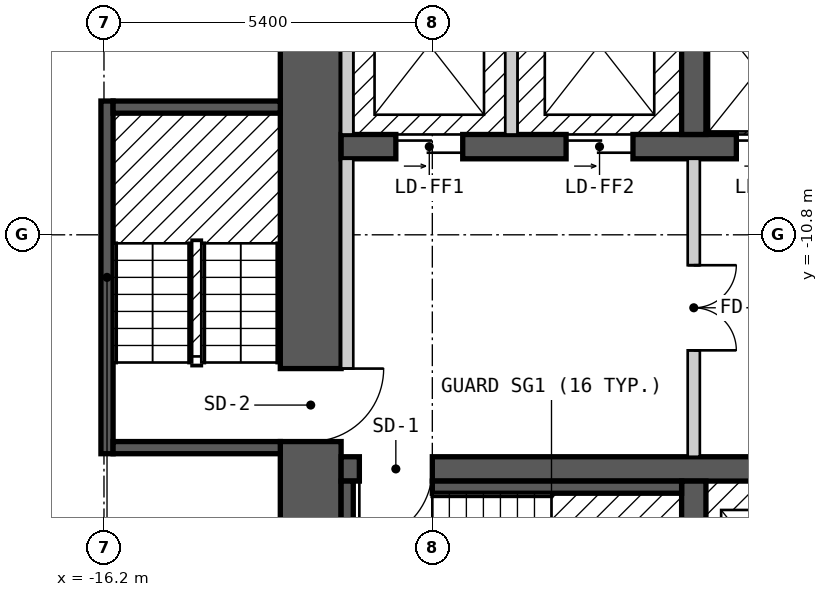
"""IFC4 building model, lengths in metres.
Left out: names, types, materials, properties, quantities, classifications, styles, units other than length and angle.
Written with IfcOpenShell. Run it as: python <this file> out.ifc"""

import sys

from ifc_helpers import new_model, si_unit, direction, frame, frame_2d, origin, place, context, subcontext, project, spatial, rectangle, extrude, element, fill, save


model = new_model("IFC4")
c1 = context("Model", 3, precision=1e-05, world=origin(), true_north=direction((0.0, 1.0)))
c2 = subcontext(c1, "Body", "Model", "MODEL_VIEW")
j1 = project(units=[si_unit("LENGTHUNIT", "METRE"), si_unit("PLANEANGLEUNIT", "RADIAN")], contexts=[c1])
p1 = place(None, origin())
s1 = spatial("IfcSite", under=j1, at=p1, CompositionType="ELEMENT")
p2 = place(p1, origin())
s2 = spatial("IfcBuilding", under=s1, at=p2, CompositionType="ELEMENT")
p3 = place(p2, frame((0.0, 0.0, 93.0)))
s3 = spatial("IfcBuildingStorey", under=s2, at=p3, CompositionType="ELEMENT", Elevation=93.0)
p4 = place(p3, frame((-12.8, -18.0, 0.0), z_axis=(0.0, 0.0, 1.0), x_axis=(0.0, 1.0, 0.0)))
e1 = element("IfcWall", 1, at=p4, inside=s3, PredefinedType="SHEAR", context=c2, shape_type="SweptSolid", body=[
    extrude(rectangle(XDim=12.0, YDim=1.0, at=frame_2d((6.0, 0.0))), origin(), (0.0, 0.0, 1.0), 2.7),
])
p5 = place(p4, frame((3.8, 0.0, 0.0)))
e2 = element("IfcOpeningElement", 2, at=p5, cuts=e1, PredefinedType="OPENING", context=c2, shape_type="SweptSolid", body=[
    extrude(rectangle(XDim=1.2, YDim=2.1, at=frame_2d((0.6, 1.05))), frame((0.0, 0.51, 0.0), z_axis=(0.0, -1.0, 0.0), x_axis=(1.0, 0.0, 0.0)), (0.0, 0.0, 1.0), 1.02),
])
p6 = place(p3, frame((-12.3, -14.65, 0.0), z_axis=(0.0, 0.0, 1.0), x_axis=(1.0, 0.0, 0.0)))
e3 = element("IfcWall", 3, at=p6, inside=s3, PredefinedType="SHEAR", context=c2, shape_type="SweptSolid", body=[
    extrude(rectangle(XDim=24.6, YDim=0.4, at=frame_2d((12.3, 0.0))), origin(), (0.0, 0.0, 1.0), 2.7),
])
p7 = place(p6, frame((1.5, 0.0, 0.0), z_axis=(0.0, 0.0, 1.0), x_axis=(-1.0, 0.0, 0.0)))
e4 = element("IfcOpeningElement", 4, at=p7, cuts=e3, PredefinedType="OPENING", context=c2, shape_type="SweptSolid", body=[
    extrude(rectangle(XDim=1.2, YDim=2.1, at=frame_2d((0.6, 1.05))), frame((0.0, 0.21, 0.0), z_axis=(0.0, -1.0, 0.0), x_axis=(1.0, 0.0, 0.0)), (0.0, 0.0, 1.0), 0.42),
])
p8 = place(p6, frame((24.35, 0.0, 0.0), z_axis=(0.0, 0.0, 1.0), x_axis=(-1.0, 0.0, 0.0)))
e5 = element("IfcOpeningElement", 5, at=p8, cuts=e3, PredefinedType="OPENING", context=c2, shape_type="SweptSolid", body=[
    extrude(rectangle(XDim=1.2, YDim=2.1, at=frame_2d((0.6, 1.05))), frame((0.0, 0.21, 0.0), z_axis=(0.0, -1.0, 0.0), x_axis=(1.0, 0.0, 0.0)), (0.0, 0.0, 1.0), 0.42),
])
p9 = place(p6, frame((16.8, 0.0, 0.0), z_axis=(0.0, 0.0, 1.0), x_axis=(-1.0, 0.0, 0.0)))
e6 = element("IfcOpeningElement", 6, at=p9, cuts=e3, PredefinedType="OPENING", context=c2, shape_type="SweptSolid", body=[
    extrude(rectangle(XDim=1.0, YDim=2.1, at=frame_2d((0.5, 1.05))), frame((0.0, 0.21, 0.0), z_axis=(0.0, -1.0, 0.0), x_axis=(1.0, 0.0, 0.0)), (0.0, 0.0, 1.0), 0.42),
])
p10 = place(p6, frame((18.55, 0.0, 0.0), z_axis=(0.0, 0.0, 1.0), x_axis=(-1.0, 0.0, 0.0)))
e7 = element("IfcOpeningElement", 7, at=p10, cuts=e3, PredefinedType="OPENING", context=c2, shape_type="SweptSolid", body=[
    extrude(rectangle(XDim=0.9, YDim=2.1, at=frame_2d((0.45, 1.05))), frame((0.0, 0.21, 0.0), z_axis=(0.0, -1.0, 0.0), x_axis=(1.0, 0.0, 0.0)), (0.0, 0.0, 1.0), 0.42),
])
p11 = place(p3, frame((-12.3, -9.35, 0.0), z_axis=(0.0, 0.0, 1.0), x_axis=(1.0, 0.0, 0.0)))
e8 = element("IfcWall", 8, at=p11, inside=s3, PredefinedType="SHEAR", context=c2, shape_type="SweptSolid", body=[
    extrude(rectangle(XDim=22.5, YDim=0.4, at=frame_2d((11.25, 0.0))), origin(), (0.0, 0.0, 1.0), 2.7),
])
p12 = place(p11, frame((0.9, 0.0, 0.0)))
e9 = element("IfcOpeningElement", 9, at=p12, cuts=e8, PredefinedType="OPENING", context=c2, shape_type="SweptSolid", body=[
    extrude(rectangle(XDim=1.1, YDim=2.1, at=frame_2d((0.55, 1.05))), frame((0.0, 0.21, 0.0), z_axis=(0.0, -1.0, 0.0), x_axis=(1.0, 0.0, 0.0)), (0.0, 0.0, 1.0), 0.42),
])
p13 = place(p11, frame((3.7, 0.0, 0.0)))
e10 = element("IfcOpeningElement", 10, at=p13, cuts=e8, PredefinedType="OPENING", context=c2, shape_type="SweptSolid", body=[
    extrude(rectangle(XDim=1.1, YDim=2.1, at=frame_2d((0.55, 1.05))), frame((0.0, 0.21, 0.0), z_axis=(0.0, -1.0, 0.0), x_axis=(1.0, 0.0, 0.0)), (0.0, 0.0, 1.0), 0.42),
])
p14 = place(p11, frame((6.5, 0.0, 0.0)))
e11 = element("IfcOpeningElement", 11, at=p14, cuts=e8, PredefinedType="OPENING", context=c2, shape_type="SweptSolid", body=[
    extrude(rectangle(XDim=1.1, YDim=2.1, at=frame_2d((0.55, 1.05))), frame((0.0, 0.21, 0.0), z_axis=(0.0, -1.0, 0.0), x_axis=(1.0, 0.0, 0.0)), (0.0, 0.0, 1.0), 0.42),
])
p15 = place(p11, frame((8.8, 0.0, 0.0)))
e12 = element("IfcOpeningElement", 12, at=p15, cuts=e8, PredefinedType="OPENING", context=c2, shape_type="SweptSolid", body=[
    extrude(rectangle(XDim=1.1, YDim=2.1, at=frame_2d((0.55, 1.05))), frame((0.0, 0.21, 0.0), z_axis=(0.0, -1.0, 0.0), x_axis=(1.0, 0.0, 0.0)), (0.0, 0.0, 1.0), 0.42),
])
p16 = place(p11, frame((11.1, 0.0, 0.0)))
e13 = element("IfcOpeningElement", 13, at=p16, cuts=e8, PredefinedType="OPENING", context=c2, shape_type="SweptSolid", body=[
    extrude(rectangle(XDim=1.1, YDim=2.1, at=frame_2d((0.55, 1.05))), frame((0.0, 0.21, 0.0), z_axis=(0.0, -1.0, 0.0), x_axis=(1.0, 0.0, 0.0)), (0.0, 0.0, 1.0), 0.42),
])
p17 = place(p11, frame((13.4, 0.0, 0.0)))
e14 = element("IfcOpeningElement", 14, at=p17, cuts=e8, PredefinedType="OPENING", context=c2, shape_type="SweptSolid", body=[
    extrude(rectangle(XDim=1.1, YDim=2.1, at=frame_2d((0.55, 1.05))), frame((0.0, 0.21, 0.0), z_axis=(0.0, -1.0, 0.0), x_axis=(1.0, 0.0, 0.0)), (0.0, 0.0, 1.0), 0.42),
])
p18 = place(p11, frame((15.7, 0.0, 0.0)))
e15 = element("IfcOpeningElement", 15, at=p18, cuts=e8, PredefinedType="OPENING", context=c2, shape_type="SweptSolid", body=[
    extrude(rectangle(XDim=1.1, YDim=2.1, at=frame_2d((0.55, 1.05))), frame((0.0, 0.21, 0.0), z_axis=(0.0, -1.0, 0.0), x_axis=(1.0, 0.0, 0.0)), (0.0, 0.0, 1.0), 0.42),
])
p19 = place(p11, frame((18.0, 0.0, 0.0)))
e16 = element("IfcOpeningElement", 16, at=p19, cuts=e8, PredefinedType="OPENING", context=c2, shape_type="SweptSolid", body=[
    extrude(rectangle(XDim=1.1, YDim=2.1, at=frame_2d((0.55, 1.05))), frame((0.0, 0.21, 0.0), z_axis=(0.0, -1.0, 0.0), x_axis=(1.0, 0.0, 0.0)), (0.0, 0.0, 1.0), 0.42),
])
p20 = place(p11, frame((20.4, 0.0, 0.0)))
e17 = element("IfcOpeningElement", 17, at=p20, cuts=e8, PredefinedType="OPENING", context=c2, shape_type="SweptSolid", body=[
    extrude(rectangle(XDim=1.1, YDim=2.1, at=frame_2d((0.55, 1.05))), frame((0.0, 0.21, 0.0), z_axis=(0.0, -1.0, 0.0), x_axis=(1.0, 0.0, 0.0)), (0.0, 0.0, 1.0), 0.42),
])
for number, where, z_axis, x_axis in (
    (18, (-6.5, -18.0, 0.0), (0.0, 0.0, 1.0), (0.0, 1.0, 0.0)),
    (19, (-6.5, -9.15, 0.0), (0.0, 0.0, 1.0), (0.0, 1.0, 0.0)),
):
    element("IfcWall", number, at=place(p3, frame(where, z_axis=z_axis, x_axis=x_axis)), inside=s3, PredefinedType="SHEAR", context=c2, shape_type="SweptSolid", body=[
        extrude(rectangle(XDim=3.15, YDim=0.4, at=frame_2d((1.575, 0.0))), origin(), (0.0, 0.0, 1.0), 2.7),
    ])
p21 = place(p3, frame((-16.15, -14.4, 0.0), z_axis=(0.0, 0.0, 1.0), x_axis=(0.0, 1.0, 0.0)))
e20 = element("IfcWall", 20, at=p21, inside=s3, PredefinedType="SOLIDWALL", context=c2, shape_type="SweptSolid", body=[
    extrude(rectangle(XDim=5.8, YDim=0.2, at=frame_2d((2.9, 0.0))), origin(), (0.0, 0.0, 1.0), 2.7),
])
for number, where, z_axis, x_axis in (
    (21, (-16.05, -14.3, 0.0), (0.0, 0.0, 1.0), (1.0, 0.0, 0.0)),
    (22, (-16.05, -8.7, 0.0), (0.0, 0.0, 1.0), (1.0, 0.0, 0.0)),
):
    element("IfcWall", number, at=place(p3, frame(where, z_axis=z_axis, x_axis=x_axis)), inside=s3, PredefinedType="SOLIDWALL", context=c2, shape_type="SweptSolid", body=[
        extrude(rectangle(XDim=2.75, YDim=0.2, at=frame_2d((1.375, 0.0))), origin(), (0.0, 0.0, 1.0), 2.7),
    ])
p22 = place(p3, frame((-12.2, -18.0, 0.0), z_axis=(0.0, 0.0, 1.0), x_axis=(0.0, 1.0, 0.0)))
e23 = element("IfcWall", 23, at=p22, inside=s3, PredefinedType="SOLIDWALL", context=c2, shape_type="SweptSolid", body=[
    extrude(rectangle(XDim=3.15, YDim=0.2, at=frame_2d((1.575, 0.0))), origin(), (0.0, 0.0, 1.0), 2.7),
])
p23 = place(p3, frame((-12.2, -13.0, 0.0), z_axis=(0.0, 0.0, 1.0), x_axis=(0.0, 1.0, 0.0)))
e24 = element("IfcWall", 24, at=p23, inside=s3, PredefinedType="PARTITIONING", context=c2, shape_type="SweptSolid", body=[
    extrude(rectangle(XDim=3.45, YDim=0.2, at=frame_2d((1.725, 0.0))), origin(), (0.0, 0.0, 1.0), 2.7),
])
p24 = place(p3, frame((-12.2, -9.15, 0.0), z_axis=(0.0, 0.0, 1.0), x_axis=(0.0, 1.0, 0.0)))
e25 = element("IfcWall", 25, at=p24, inside=s3, PredefinedType="SOLIDWALL", context=c2, shape_type="SweptSolid", body=[
    extrude(rectangle(XDim=3.15, YDim=0.2, at=frame_2d((1.575, 0.0))), origin(), (0.0, 0.0, 1.0), 2.7),
])
p25 = place(p3, frame((-10.8, -14.95, 0.0), z_axis=(0.0, 0.0, 1.0), x_axis=(1.0, 0.0, 0.0)))
e26 = element("IfcWall", 26, at=p25, inside=s3, PredefinedType="SOLIDWALL", context=c2, shape_type="SweptSolid", body=[
    extrude(rectangle(XDim=4.1, YDim=0.2, at=frame_2d((2.05, 0.0))), origin(), (0.0, 0.0, 1.0), 2.7),
])
p26 = place(p3, frame((-9.5, -9.15, 0.0), z_axis=(0.0, 0.0, 1.0), x_axis=(0.0, 1.0, 0.0)))
e27 = element("IfcWall", 27, at=p26, inside=s3, PredefinedType="SOLIDWALL", context=c2, shape_type="SweptSolid", body=[
    extrude(rectangle(XDim=2.95, YDim=0.2, at=frame_2d((1.475, 0.0))), origin(), (0.0, 0.0, 1.0), 2.7),
])
p27 = place(p3, frame((-6.5, -14.45, 0.0), z_axis=(0.0, 0.0, 1.0), x_axis=(0.0, 1.0, 0.0)))
e28 = element("IfcWall", 28, at=p27, inside=s3, PredefinedType="PARTITIONING", context=c2, shape_type="SweptSolid", body=[
    extrude(rectangle(XDim=4.9, YDim=0.2, at=frame_2d((2.45, 0.0))), origin(), (0.0, 0.0, 1.0), 2.7),
])
p28 = place(p27, frame((3.15, 0.0, 0.0), z_axis=(0.0, 0.0, 1.0), x_axis=(-1.0, 0.0, 0.0)))
e29 = element("IfcOpeningElement", 29, at=p28, cuts=e28, PredefinedType="OPENING", context=c2, shape_type="SweptSolid", body=[
    extrude(rectangle(XDim=1.4, YDim=2.1, at=frame_2d((0.7, 1.05))), frame((0.0, 0.11, 0.0), z_axis=(0.0, -1.0, 0.0), x_axis=(1.0, 0.0, 0.0)), (0.0, 0.0, 1.0), 0.22),
])
p29 = place(p12, origin())
e30 = element("IfcDoor", 30, at=p29, inside=s3, OperationType="DOUBLE_DOOR_SLIDING", PredefinedType="DOOR", context=c2, shape_type="SweptSolid", body=[
    extrude(rectangle(XDim=1.1, YDim=2.1, at=frame_2d((0.55, 1.05))), frame((0.0, 0.025, 0.0), z_axis=(0.0, -1.0, 0.0), x_axis=(1.0, 0.0, 0.0)), (0.0, 0.0, 1.0), 0.05),
])
fill(e9, e30)
p30 = place(p13, origin())
e31 = element("IfcDoor", 31, at=p30, inside=s3, OperationType="DOUBLE_DOOR_SLIDING", PredefinedType="DOOR", context=c2, shape_type="SweptSolid", body=[
    extrude(rectangle(XDim=1.1, YDim=2.1, at=frame_2d((0.55, 1.05))), frame((0.0, 0.025, 0.0), z_axis=(0.0, -1.0, 0.0), x_axis=(1.0, 0.0, 0.0)), (0.0, 0.0, 1.0), 0.05),
])
fill(e10, e31)
p31 = place(p14, origin())
e32 = element("IfcDoor", 32, at=p31, inside=s3, OperationType="DOUBLE_DOOR_SLIDING", PredefinedType="DOOR", context=c2, shape_type="SweptSolid", body=[
    extrude(rectangle(XDim=1.1, YDim=2.1, at=frame_2d((0.55, 1.05))), frame((0.0, 0.025, 0.0), z_axis=(0.0, -1.0, 0.0), x_axis=(1.0, 0.0, 0.0)), (0.0, 0.0, 1.0), 0.05),
])
fill(e11, e32)
p32 = place(p7, origin())
e33 = element("IfcDoor", 33, at=p32, inside=s3, OperationType="SINGLE_SWING_RIGHT", PredefinedType="DOOR", context=c2, shape_type="SweptSolid", body=[
    extrude(rectangle(XDim=1.2, YDim=2.1, at=frame_2d((0.6, 1.05))), frame((0.0, 0.025, 0.0), z_axis=(0.0, -1.0, 0.0), x_axis=(1.0, 0.0, 0.0)), (0.0, 0.0, 1.0), 0.05),
])
fill(e4, e33)
p33 = place(p5, origin())
e34 = element("IfcDoor", 34, at=p33, inside=s3, OperationType="SINGLE_SWING_RIGHT", PredefinedType="DOOR", context=c2, shape_type="SweptSolid", body=[
    extrude(rectangle(XDim=1.2, YDim=2.1, at=frame_2d((0.6, 1.05))), frame((0.0, 0.025, 0.0), z_axis=(0.0, -1.0, 0.0), x_axis=(1.0, 0.0, 0.0)), (0.0, 0.0, 1.0), 0.05),
])
fill(e2, e34)
p34 = place(p28, origin())
e35 = element("IfcDoor", 35, at=p34, inside=s3, OperationType="DOUBLE_DOOR_SINGLE_SWING", PredefinedType="DOOR", context=c2, shape_type="SweptSolid", body=[
    extrude(rectangle(XDim=1.4, YDim=2.1, at=frame_2d((0.7, 1.05))), frame((0.0, 0.025, 0.0), z_axis=(0.0, -1.0, 0.0), x_axis=(1.0, 0.0, 0.0)), (0.0, 0.0, 1.0), 0.05),
])
fill(e29, e35)
save(model, sys.argv[1])
